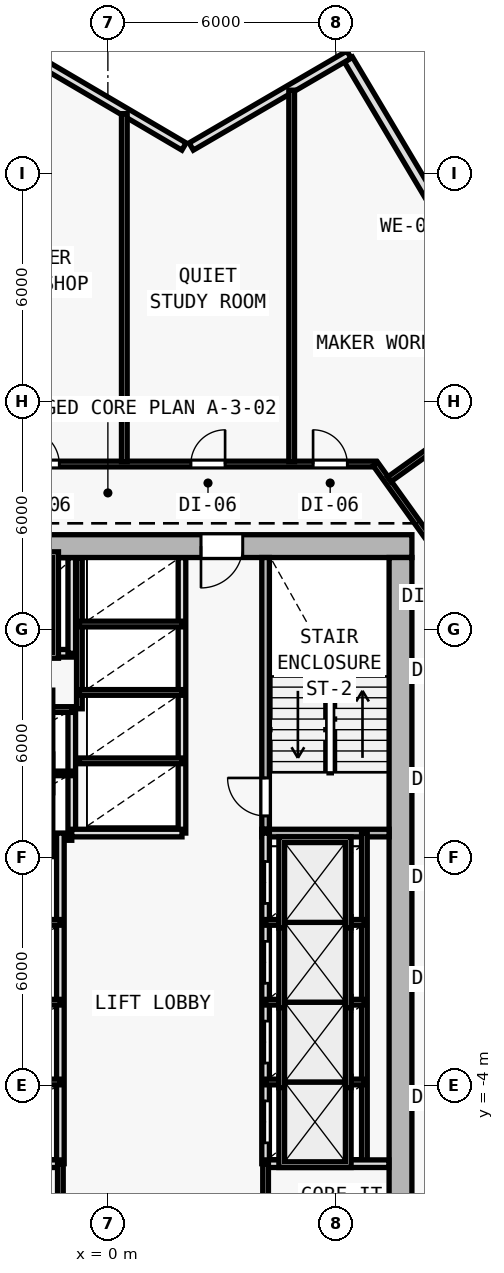
"""IFC4 building model, lengths in metres.
Left out: names, types, materials, properties, quantities, classifications, styles, units other than length and angle.
Written with IfcOpenShell. Run it as: python <this file> out.ifc"""

import sys

from ifc_helpers import new_model, si_unit, direction, frame, frame_2d, origin, origin_2d, place, context, subcontext, project, spatial, rectangle, i_section, extrude, element, fill, save


model = new_model("IFC4")
c1 = context("Model", 3, precision=1e-05, world=origin(), true_north=direction((0.0, 1.0)))
c2 = subcontext(c1, "Body", "Model", "MODEL_VIEW")
j1 = project(units=[si_unit("LENGTHUNIT", "METRE"), si_unit("PLANEANGLEUNIT", "RADIAN")], contexts=[c1])
p1 = place(None, origin())
s1 = spatial("IfcSite", under=j1, at=p1, CompositionType="ELEMENT")
p2 = place(p1, origin())
s2 = spatial("IfcBuilding", under=s1, at=p2, CompositionType="ELEMENT")
p3 = place(p2, frame((0.0, 0.0, 58.8)))
s3 = spatial("IfcBuildingStorey", under=s2, at=p3, CompositionType="ELEMENT", Elevation=58.8)
for number, where, z_axis, x_axis in (
    (1, (7.7, 10.2, 0.0), (0.0, 0.0, 1.0), (1.0, 0.0, 0.0)),
    (2, (7.7, 0.4, 0.0), (0.0, 0.0, 1.0), (1.0, 0.0, 0.0)),
):
    element("IfcColumn", number, at=place(p3, frame(where, z_axis=z_axis, x_axis=x_axis)), inside=s3, PredefinedType="COLUMN", context=c2, shape_type="SweptSolid", body=[
        extrude(i_section(OverallWidth=0.416, OverallDepth=0.446, WebThickness=0.025, FlangeThickness=0.04, FilletRadius=0.015, at=origin_2d()), origin(), (0.0, 0.0, 1.0), 3.6),
    ])
p4 = place(p3, frame((6.328, 23.006, 0.0), z_axis=(0.0, 0.0, 1.0), x_axis=(0.511075811474, -0.859535639125, 0.0)))
e3 = element("IfcWall", 3, at=p4, inside=s3, PredefinedType="SOLIDWALL", context=c2, shape_type="SweptSolid", body=[
    extrude(rectangle(XDim=11.646, YDim=0.25, at=frame_2d((5.823, 0.0))), origin(), (0.0, 0.0, 1.0), 3.35),
])
p5 = place(p4, frame((5.073, 0.0, 0.62)))
e4 = element("IfcOpeningElement", 4, at=p5, cuts=e3, PredefinedType="OPENING", context=c2, shape_type="SweptSolid", body=[
    extrude(rectangle(XDim=1.5, YDim=2.0, at=frame_2d((0.75, 1.0))), frame((0.0, 0.135, 0.0), z_axis=(0.0, -1.0, 0.0), x_axis=(1.0, 0.0, 0.0)), (0.0, 0.0, 1.0), 0.27),
])
p6 = place(p3, frame((2.193, 20.713, 0.0), z_axis=(0.0, 0.0, 1.0), x_axis=(0.863964978951, 0.503551899159, 0.0)))
e5 = element("IfcWall", 5, at=p6, inside=s3, PredefinedType="SOLIDWALL", context=c2, shape_type="SweptSolid", body=[
    extrude(rectangle(XDim=4.805, YDim=0.22, at=frame_2d((2.402, 0.0))), origin(), (0.0, 0.0, 1.0), 3.35),
])
p7 = place(p3, frame((-2.572, 23.403, 0.0), z_axis=(0.0, 0.0, 1.0), x_axis=(0.862137551275, -0.506674296449, 0.0)))
e6 = element("IfcWall", 6, at=p7, inside=s3, PredefinedType="SOLIDWALL", context=c2, shape_type="SweptSolid", body=[
    extrude(rectangle(XDim=5.307, YDim=0.22, at=frame_2d((2.654, 0.0))), origin(), (0.0, 0.0, 1.0), 3.35),
])
p8 = place(p3, frame((8.0, 10.2, 0.0), z_axis=(0.0, 0.0, 1.0), x_axis=(-1.0, 0.0, 0.0)))
e7 = element("IfcWall", 7, at=p8, inside=s3, PredefinedType="SHEAR", context=c2, shape_type="SweptSolid", body=[
    extrude(rectangle(XDim=16.0, YDim=0.6, at=frame_2d((8.0, 0.0))), origin(), (0.0, 0.0, 1.0), 3.35),
])
p9 = place(p8, frame((4.45, 0.0, 0.0)))
e8 = element("IfcOpeningElement", 8, at=p9, cuts=e7, PredefinedType="OPENING", context=c2, shape_type="SweptSolid", body=[
    extrude(rectangle(XDim=1.1, YDim=2.15, at=frame_2d((0.55, 1.075))), frame((0.0, 0.31, 0.0), z_axis=(0.0, -1.0, 0.0), x_axis=(1.0, 0.0, 0.0)), (0.0, 0.0, 1.0), 0.62),
])
p10 = place(p3, frame((7.7, 9.9, 0.0), z_axis=(0.0, 0.0, 1.0), x_axis=(0.0, -1.0, 0.0)))
e9 = element("IfcWall", 9, at=p10, inside=s3, PredefinedType="SHEAR", context=c2, shape_type="SweptSolid", body=[
    extrude(rectangle(XDim=19.0, YDim=0.6, at=frame_2d((9.5, 0.0))), origin(), (0.0, 0.0, 1.0), 3.35),
])
p11 = place(p3, frame((4.15, 2.75, 0.0), z_axis=(0.0, 0.0, 1.0), x_axis=(0.0, 1.0, 0.0)))
e10 = element("IfcWall", 10, at=p11, inside=s3, PredefinedType="SOLIDWALL", context=c2, shape_type="SweptSolid", body=[
    extrude(rectangle(XDim=7.15, YDim=0.2, at=frame_2d((3.575, 0.0))), origin(), (0.0, 0.0, 1.0), 3.35),
])
p12 = place(p11, frame((0.35, 0.0, 0.0)))
e11 = element("IfcOpeningElement", 11, at=p12, cuts=e10, PredefinedType="OPENING", context=c2, shape_type="SweptSolid", body=[
    extrude(rectangle(XDim=1.0, YDim=2.15, at=frame_2d((0.5, 1.075))), frame((0.0, 0.11, 0.0), z_axis=(0.0, -1.0, 0.0), x_axis=(1.0, 0.0, 0.0)), (0.0, 0.0, 1.0), 0.22),
])
p13 = place(p3, frame((4.05, 2.65, 0.0), z_axis=(0.0, 0.0, 1.0), x_axis=(1.0, 0.0, 0.0)))
e12 = element("IfcWall", 12, at=p13, inside=s3, PredefinedType="SOLIDWALL", context=c2, shape_type="SweptSolid", body=[
    extrude(rectangle(XDim=3.35, YDim=0.2, at=frame_2d((1.675, 0.0))), origin(), (0.0, 0.0, 1.0), 3.35),
])
p14 = place(p3, frame((-0.95, 2.65, 0.0), z_axis=(0.0, 0.0, 1.0), x_axis=(0.0, 1.0, 0.0)))
e13 = element("IfcWall", 13, at=p14, inside=s3, PredefinedType="SOLIDWALL", context=c2, shape_type="SweptSolid", body=[
    extrude(rectangle(XDim=3.27, YDim=0.2, at=frame_2d((1.635, 0.0))), origin(), (0.0, 0.0, 1.0), 3.35),
])
for number, where, z_axis, x_axis in (
    (14, (-3.85, 2.52, 0.0), (0.0, 0.0, 1.0), (1.0, 0.0, 0.0)),
    (15, (-3.85, 4.22, 0.0), (0.0, 0.0, 1.0), (1.0, 0.0, 0.0)),
):
    element("IfcWall", number, at=place(p3, frame(where, z_axis=z_axis, x_axis=x_axis)), inside=s3, PredefinedType="PARTITIONING", context=c2, shape_type="SweptSolid", body=[
        extrude(rectangle(XDim=2.9, YDim=0.12, at=frame_2d((1.45, 0.0))), origin(), (0.0, 0.0, 1.0), 3.35),
    ])
p15 = place(p3, frame((-3.85, 5.9, 0.0), z_axis=(0.0, 0.0, 1.0), x_axis=(1.0, 0.0, 0.0)))
e16 = element("IfcWall", 16, at=p15, inside=s3, PredefinedType="PARTITIONING", context=c2, shape_type="SweptSolid", body=[
    extrude(rectangle(XDim=2.9, YDim=0.15, at=frame_2d((1.45, 0.0))), origin(), (0.0, 0.0, 1.0), 3.35),
])
p16 = place(p3, frame((-3.85, 7.38, 0.0), z_axis=(0.0, 0.0, 1.0), x_axis=(1.0, 0.0, 0.0)))
e17 = element("IfcWall", 17, at=p16, inside=s3, PredefinedType="SOLIDWALL", context=c2, shape_type="SweptSolid", body=[
    extrude(rectangle(XDim=2.9, YDim=0.2, at=frame_2d((1.45, 0.0))), origin(), (0.0, 0.0, 1.0), 3.35),
])
p17 = place(p16, frame((0.85, 0.0, 0.0)))
e18 = element("IfcOpeningElement", 18, at=p17, cuts=e17, PredefinedType="OPENING", context=c2, shape_type="SweptSolid", body=[
    extrude(rectangle(XDim=1.2, YDim=2.2, at=frame_2d((0.6, 1.1))), frame((0.0, 0.11, 0.0), z_axis=(0.0, -1.0, 0.0), x_axis=(1.0, 0.0, 0.0)), (0.0, 0.0, 1.0), 0.22),
])
p18 = place(p3, frame((-0.95, 7.38, 0.0), z_axis=(0.0, 0.0, 1.0), x_axis=(0.0, 1.0, 0.0)))
e19 = element("IfcWall", 19, at=p18, inside=s3, PredefinedType="SOLIDWALL", context=c2, shape_type="SweptSolid", body=[
    extrude(rectangle(XDim=2.515, YDim=0.2, at=frame_2d((1.258, 0.0))), origin(), (0.0, 0.0, 1.0), 3.35),
])
p19 = place(p3, frame((4.15, -6.05, 0.0), z_axis=(0.0, 0.0, 1.0), x_axis=(0.0, 1.0, 0.0)))
e20 = element("IfcWall", 20, at=p19, inside=s3, PredefinedType="SOLIDWALL", context=c2, shape_type="SweptSolid", body=[
    extrude(rectangle(XDim=8.7, YDim=0.2, at=frame_2d((4.35, 0.0))), origin(), (0.0, 0.0, 1.0), 3.35),
])
p20 = place(p19, frame((0.55, 0.0, 0.0)))
e21 = element("IfcOpeningElement", 21, at=p20, cuts=e20, PredefinedType="OPENING", context=c2, shape_type="SweptSolid", body=[
    extrude(rectangle(XDim=1.1, YDim=2.15, at=frame_2d((0.55, 1.075))), frame((0.0, 0.11, 0.0), z_axis=(0.0, -1.0, 0.0), x_axis=(1.0, 0.0, 0.0)), (0.0, 0.0, 1.0), 0.22),
])
p21 = place(p19, frame((2.65, 0.0, 0.0)))
e22 = element("IfcOpeningElement", 22, at=p21, cuts=e20, PredefinedType="OPENING", context=c2, shape_type="SweptSolid", body=[
    extrude(rectangle(XDim=1.1, YDim=2.15, at=frame_2d((0.55, 1.075))), frame((0.0, 0.11, 0.0), z_axis=(0.0, -1.0, 0.0), x_axis=(1.0, 0.0, 0.0)), (0.0, 0.0, 1.0), 0.22),
])
p22 = place(p19, frame((4.75, 0.0, 0.0)))
e23 = element("IfcOpeningElement", 23, at=p22, cuts=e20, PredefinedType="OPENING", context=c2, shape_type="SweptSolid", body=[
    extrude(rectangle(XDim=1.1, YDim=2.15, at=frame_2d((0.55, 1.075))), frame((0.0, 0.11, 0.0), z_axis=(0.0, -1.0, 0.0), x_axis=(1.0, 0.0, 0.0)), (0.0, 0.0, 1.0), 0.22),
])
p23 = place(p19, frame((6.85, 0.0, 0.0)))
e24 = element("IfcOpeningElement", 24, at=p23, cuts=e20, PredefinedType="OPENING", context=c2, shape_type="SweptSolid", body=[
    extrude(rectangle(XDim=1.1, YDim=2.15, at=frame_2d((0.55, 1.075))), frame((0.0, 0.11, 0.0), z_axis=(0.0, -1.0, 0.0), x_axis=(1.0, 0.0, 0.0)), (0.0, 0.0, 1.0), 0.22),
])
p24 = place(p3, frame((6.75, -6.05, 0.0), z_axis=(0.0, 0.0, 1.0), x_axis=(0.0, 1.0, 0.0)))
e25 = element("IfcWall", 25, at=p24, inside=s3, PredefinedType="PARTITIONING", context=c2, shape_type="SweptSolid", body=[
    extrude(rectangle(XDim=8.7, YDim=0.15, at=frame_2d((4.35, 0.0))), origin(), (0.0, 0.0, 1.0), 3.35),
])
for number, where, z_axis, x_axis in (
    (26, (4.15, -3.9, 0.0), (0.0, 0.0, 1.0), (1.0, 0.0, 0.0)),
    (27, (4.15, -1.8, 0.0), (0.0, 0.0, 1.0), (1.0, 0.0, 0.0)),
    (28, (4.15, 0.3, 0.0), (0.0, 0.0, 1.0), (1.0, 0.0, 0.0)),
):
    element("IfcWall", number, at=place(p3, frame(where, z_axis=z_axis, x_axis=x_axis)), inside=s3, PredefinedType="PARTITIONING", context=c2, shape_type="SweptSolid", body=[
        extrude(rectangle(XDim=2.6, YDim=0.15, at=frame_2d((1.3, 0.0))), origin(), (0.0, 0.0, 1.0), 3.35),
    ])
p25 = place(p3, frame((-1.25, -6.05, 0.0), z_axis=(0.0, 0.0, 1.0), x_axis=(0.0, 1.0, 0.0)))
e29 = element("IfcWall", 29, at=p25, inside=s3, PredefinedType="SOLIDWALL", context=c2, shape_type="SweptSolid", body=[
    extrude(rectangle(XDim=8.7, YDim=0.2, at=frame_2d((4.35, 0.0))), origin(), (0.0, 0.0, 1.0), 3.35),
])
for number, where, z_axis, x_axis in (
    (30, (-4.15, -3.9, 0.0), (0.0, 0.0, 1.0), (1.0, 0.0, 0.0)),
    (31, (-4.15, -1.8, 0.0), (0.0, 0.0, 1.0), (1.0, 0.0, 0.0)),
    (32, (-4.15, 0.3, 0.0), (0.0, 0.0, 1.0), (1.0, 0.0, 0.0)),
):
    element("IfcWall", number, at=place(p3, frame(where, z_axis=z_axis, x_axis=x_axis)), inside=s3, PredefinedType="PARTITIONING", context=c2, shape_type="SweptSolid", body=[
        extrude(rectangle(XDim=2.9, YDim=0.15, at=frame_2d((1.45, 0.0))), origin(), (0.0, 0.0, 1.0), 3.35),
    ])
p26 = place(p3, frame((1.95, 2.65, 0.0), z_axis=(0.0, 0.0, 1.0), x_axis=(0.0, 1.0, 0.0)))
e33 = element("IfcWall", 33, at=p26, inside=s3, PredefinedType="SOLIDWALL", context=c2, shape_type="SweptSolid", body=[
    extrude(rectangle(XDim=7.245, YDim=0.2, at=frame_2d((3.623, 0.0))), origin(), (0.0, 0.0, 1.0), 3.35),
])
p27 = place(p3, frame((-0.95, 2.65, 0.0), z_axis=(0.0, 0.0, 1.0), x_axis=(1.0, 0.0, 0.0)))
e34 = element("IfcWall", 34, at=p27, inside=s3, PredefinedType="SOLIDWALL", context=c2, shape_type="SweptSolid", body=[
    extrude(rectangle(XDim=2.9, YDim=0.2, at=frame_2d((1.45, 0.0))), origin(), (0.0, 0.0, 1.0), 3.35),
])
p28 = place(p3, frame((-0.75, 5.92, 0.0), z_axis=(0.0, 0.0, 1.0), x_axis=(0.0, 1.0, 0.0)))
e35 = element("IfcWall", 35, at=p28, inside=s3, PredefinedType="PARTITIONING", context=c2, shape_type="SweptSolid", body=[
    extrude(rectangle(XDim=3.975, YDim=0.15, at=frame_2d((1.988, 0.0))), origin(), (0.0, 0.0, 1.0), 3.35),
])
for number, where, z_axis, x_axis in (
    (36, (-0.75, 4.55, 0.0), (0.0, 0.0, 1.0), (1.0, 0.0, 0.0)),
    (37, (-0.75, 6.35, 0.0), (0.0, 0.0, 1.0), (1.0, 0.0, 0.0)),
    (38, (-0.75, 8.15, 0.0), (0.0, 0.0, 1.0), (1.0, 0.0, 0.0)),
):
    element("IfcWall", number, at=place(p3, frame(where, z_axis=z_axis, x_axis=x_axis)), inside=s3, PredefinedType="PARTITIONING", context=c2, shape_type="SweptSolid", body=[
        extrude(rectangle(XDim=2.7, YDim=0.15, at=frame_2d((1.35, 0.0))), origin(), (0.0, 0.0, 1.0), 3.35),
    ])
p29 = place(p3, frame((-4.04, -6.05, 0.0), z_axis=(0.0, 0.0, 1.0), x_axis=(1.0, 0.0, 0.0)))
e39 = element("IfcWall", 39, at=p29, inside=s3, PredefinedType="SOLIDWALL", context=c2, shape_type="SweptSolid", body=[
    extrude(rectangle(XDim=2.79, YDim=0.2, at=frame_2d((1.395, 0.0))), origin(), (0.0, 0.0, 1.0), 3.35),
])
p30 = place(p3, frame((4.15, -6.05, 0.0), z_axis=(0.0, 0.0, 1.0), x_axis=(1.0, 0.0, 0.0)))
e40 = element("IfcWall", 40, at=p30, inside=s3, PredefinedType="SOLIDWALL", context=c2, shape_type="SweptSolid", body=[
    extrude(rectangle(XDim=3.245, YDim=0.2, at=frame_2d((1.623, 0.0))), origin(), (0.0, 0.0, 1.0), 3.35),
])
p31 = place(p3, frame((-1.25, -9.095, 0.0), z_axis=(0.0, 0.0, 1.0), x_axis=(0.0, 1.0, 0.0)))
e41 = element("IfcWall", 41, at=p31, inside=s3, PredefinedType="PARTITIONING", context=c2, shape_type="SweptSolid", body=[
    extrude(rectangle(XDim=3.045, YDim=0.15, at=frame_2d((1.522, 0.0))), origin(), (0.0, 0.0, 1.0), 3.35),
])
p32 = place(p31, frame((0.845, 0.0, 0.0)))
e42 = element("IfcOpeningElement", 42, at=p32, cuts=e41, PredefinedType="OPENING", context=c2, shape_type="SweptSolid", body=[
    extrude(rectangle(XDim=0.95, YDim=2.1, at=frame_2d((0.475, 1.05))), frame((0.0, 0.085, 0.0), z_axis=(0.0, -1.0, 0.0), x_axis=(1.0, 0.0, 0.0)), (0.0, 0.0, 1.0), 0.17),
])
p33 = place(p3, frame((4.15, -9.095, 0.0), z_axis=(0.0, 0.0, 1.0), x_axis=(0.0, 1.0, 0.0)))
e43 = element("IfcWall", 43, at=p33, inside=s3, PredefinedType="PARTITIONING", context=c2, shape_type="SweptSolid", body=[
    extrude(rectangle(XDim=3.045, YDim=0.15, at=frame_2d((1.522, 0.0))), origin(), (0.0, 0.0, 1.0), 3.35),
])
p34 = place(p33, frame((0.845, 0.0, 0.0)))
e44 = element("IfcOpeningElement", 44, at=p34, cuts=e43, PredefinedType="OPENING", context=c2, shape_type="SweptSolid", body=[
    extrude(rectangle(XDim=0.9, YDim=2.1, at=frame_2d((0.45, 1.05))), frame((0.0, 0.085, 0.0), z_axis=(0.0, -1.0, 0.0), x_axis=(1.0, 0.0, 0.0)), (0.0, 0.0, 1.0), 0.17),
])
p35 = place(p3, frame((-7.041, 12.36, 0.0), z_axis=(0.0, 0.0, 1.0), x_axis=(1.0, 0.0, 0.0)))
e45 = element("IfcWall", 45, at=p35, inside=s3, PredefinedType="PARTITIONING", context=c2, shape_type="SweptSolid", body=[
    extrude(rectangle(XDim=14.082, YDim=0.15, at=frame_2d((7.041, 0.0))), origin(), (0.0, 0.0, 1.0), 3.35),
])
p36 = place(p35, frame((12.441, 0.0, 0.0)))
e46 = element("IfcOpeningElement", 46, at=p36, cuts=e45, PredefinedType="OPENING", context=c2, shape_type="SweptSolid", body=[
    extrude(rectangle(XDim=0.9, YDim=2.1, at=frame_2d((0.45, 1.05))), frame((0.0, 0.085, 0.0), z_axis=(0.0, -1.0, 0.0), x_axis=(1.0, 0.0, 0.0)), (0.0, 0.0, 1.0), 0.17),
])
p37 = place(p35, frame((9.226, 0.0, 0.0)))
e47 = element("IfcOpeningElement", 47, at=p37, cuts=e45, PredefinedType="OPENING", context=c2, shape_type="SweptSolid", body=[
    extrude(rectangle(XDim=0.9, YDim=2.1, at=frame_2d((0.45, 1.05))), frame((0.0, 0.085, 0.0), z_axis=(0.0, -1.0, 0.0), x_axis=(1.0, 0.0, 0.0)), (0.0, 0.0, 1.0), 0.17),
])
p38 = place(p35, frame((4.862, 0.0, 0.0)))
e48 = element("IfcOpeningElement", 48, at=p38, cuts=e45, PredefinedType="OPENING", context=c2, shape_type="SweptSolid", body=[
    extrude(rectangle(XDim=0.9, YDim=2.1, at=frame_2d((0.45, 1.05))), frame((0.0, 0.085, 0.0), z_axis=(0.0, -1.0, 0.0), x_axis=(1.0, 0.0, 0.0)), (0.0, 0.0, 1.0), 0.17),
])
p39 = place(p35, frame((1.214, 0.0, 0.0)))
e49 = element("IfcOpeningElement", 49, at=p39, cuts=e45, PredefinedType="OPENING", context=c2, shape_type="SweptSolid", body=[
    extrude(rectangle(XDim=0.9, YDim=2.1, at=frame_2d((0.45, 1.05))), frame((0.0, 0.085, 0.0), z_axis=(0.0, -1.0, 0.0), x_axis=(1.0, 0.0, 0.0)), (0.0, 0.0, 1.0), 0.17),
])
p40 = place(p3, frame((7.041, 12.36, 0.0), z_axis=(0.0, 0.0, 1.0), x_axis=(0.582449511476, -0.812866881218, 0.0)))
e50 = element("IfcWall", 50, at=p40, inside=s3, PredefinedType="PARTITIONING", context=c2, shape_type="SweptSolid", body=[
    extrude(rectangle(XDim=4.84, YDim=0.15, at=frame_2d((2.42, 0.0))), origin(), (0.0, 0.0, 1.0), 2.725),
])
p41 = place(p40, frame((2.775, 0.0, 0.0)))
e51 = element("IfcOpeningElement", 51, at=p41, cuts=e50, PredefinedType="OPENING", context=c2, shape_type="SweptSolid", body=[
    extrude(rectangle(XDim=0.85, YDim=2.1, at=frame_2d((0.425, 1.05))), frame((0.0, 0.085, 0.0), z_axis=(0.0, -1.0, 0.0), x_axis=(1.0, 0.0, 0.0)), (0.0, 0.0, 1.0), 0.17),
])
p42 = place(p3, frame((7.404, 11.957, 0.0), z_axis=(0.0, 0.0, 1.0), x_axis=(0.812874232522, 0.582439251856, 0.0)))
e52 = element("IfcWall", 52, at=p42, inside=s3, PredefinedType="PARTITIONING", context=c2, shape_type="SweptSolid", body=[
    extrude(rectangle(XDim=4.689, YDim=0.15, at=frame_2d((2.345, 0.0))), origin(), (0.0, 0.0, 1.0), 2.725),
])
p43 = place(p3, frame((0.433, 12.42, 0.0), z_axis=(0.0, 0.0, 1.0), x_axis=(0.0, 1.0, 0.0)))
e53 = element("IfcWall", 53, at=p43, inside=s3, PredefinedType="PARTITIONING", context=c2, shape_type="SweptSolid", body=[
    extrude(rectangle(XDim=9.159, YDim=0.15, at=frame_2d((4.58, 0.0))), origin(), (0.0, 0.0, 1.0), 2.735),
])
p44 = place(p3, frame((4.836, 12.42, 0.0), z_axis=(0.0, 0.0, 1.0), x_axis=(0.0, 1.0, 0.0)))
e54 = element("IfcWall", 54, at=p44, inside=s3, PredefinedType="PARTITIONING", context=c2, shape_type="SweptSolid", body=[
    extrude(rectangle(XDim=9.776, YDim=0.15, at=frame_2d((4.888, 0.0))), origin(), (0.0, 0.0, 1.0), 2.735),
])
p45 = place(p9, origin())
e55 = element("IfcDoor", 55, at=p45, inside=s3, OperationType="SINGLE_SWING_RIGHT", PredefinedType="DOOR", context=c2, shape_type="SweptSolid", body=[
    extrude(rectangle(XDim=1.1, YDim=2.15, at=frame_2d((0.55, 1.075))), frame((0.0, 0.025, 0.0), z_axis=(0.0, -1.0, 0.0), x_axis=(1.0, 0.0, 0.0)), (0.0, 0.0, 1.0), 0.05),
])
fill(e8, e55)
p46 = place(p12, origin())
e56 = element("IfcDoor", 56, at=p46, inside=s3, OperationType="SINGLE_SWING_RIGHT", PredefinedType="DOOR", context=c2, shape_type="SweptSolid", body=[
    extrude(rectangle(XDim=1.0, YDim=2.15, at=frame_2d((0.5, 1.075))), frame((0.0, 0.025, 0.0), z_axis=(0.0, -1.0, 0.0), x_axis=(1.0, 0.0, 0.0)), (0.0, 0.0, 1.0), 0.05),
])
fill(e11, e56)
p47 = place(p20, origin())
e57 = element("IfcDoor", 57, at=p47, inside=s3, OperationType="DOUBLE_DOOR_SLIDING", PredefinedType="DOOR", context=c2, shape_type="SweptSolid", body=[
    extrude(rectangle(XDim=1.1, YDim=2.15, at=frame_2d((0.55, 1.075))), frame((0.0, 0.025, 0.0), z_axis=(0.0, -1.0, 0.0), x_axis=(1.0, 0.0, 0.0)), (0.0, 0.0, 1.0), 0.05),
])
fill(e21, e57)
p48 = place(p21, origin())
e58 = element("IfcDoor", 58, at=p48, inside=s3, OperationType="DOUBLE_DOOR_SLIDING", PredefinedType="DOOR", context=c2, shape_type="SweptSolid", body=[
    extrude(rectangle(XDim=1.1, YDim=2.15, at=frame_2d((0.55, 1.075))), frame((0.0, 0.025, 0.0), z_axis=(0.0, -1.0, 0.0), x_axis=(1.0, 0.0, 0.0)), (0.0, 0.0, 1.0), 0.05),
])
fill(e22, e58)
p49 = place(p22, origin())
e59 = element("IfcDoor", 59, at=p49, inside=s3, OperationType="DOUBLE_DOOR_SLIDING", PredefinedType="DOOR", context=c2, shape_type="SweptSolid", body=[
    extrude(rectangle(XDim=1.1, YDim=2.15, at=frame_2d((0.55, 1.075))), frame((0.0, 0.025, 0.0), z_axis=(0.0, -1.0, 0.0), x_axis=(1.0, 0.0, 0.0)), (0.0, 0.0, 1.0), 0.05),
])
fill(e23, e59)
p50 = place(p23, origin())
e60 = element("IfcDoor", 60, at=p50, inside=s3, OperationType="DOUBLE_DOOR_SLIDING", PredefinedType="DOOR", context=c2, shape_type="SweptSolid", body=[
    extrude(rectangle(XDim=1.1, YDim=2.15, at=frame_2d((0.55, 1.075))), frame((0.0, 0.025, 0.0), z_axis=(0.0, -1.0, 0.0), x_axis=(1.0, 0.0, 0.0)), (0.0, 0.0, 1.0), 0.05),
])
fill(e24, e60)
p51 = place(p36, origin())
e61 = element("IfcDoor", 61, at=p51, inside=s3, OperationType="SINGLE_SWING_LEFT", PredefinedType="DOOR", context=c2, shape_type="SweptSolid", body=[
    extrude(rectangle(XDim=0.9, YDim=2.1, at=frame_2d((0.45, 1.05))), frame((0.0, 0.025, 0.0), z_axis=(0.0, -1.0, 0.0), x_axis=(1.0, 0.0, 0.0)), (0.0, 0.0, 1.0), 0.05),
])
fill(e46, e61)
p52 = place(p37, origin())
e62 = element("IfcDoor", 62, at=p52, inside=s3, OperationType="SINGLE_SWING_RIGHT", PredefinedType="DOOR", context=c2, shape_type="SweptSolid", body=[
    extrude(rectangle(XDim=0.9, YDim=2.1, at=frame_2d((0.45, 1.05))), frame((0.0, 0.025, 0.0), z_axis=(0.0, -1.0, 0.0), x_axis=(1.0, 0.0, 0.0)), (0.0, 0.0, 1.0), 0.05),
])
fill(e47, e62)
p53 = place(p38, origin())
e63 = element("IfcDoor", 63, at=p53, inside=s3, OperationType="SINGLE_SWING_LEFT", PredefinedType="DOOR", context=c2, shape_type="SweptSolid", body=[
    extrude(rectangle(XDim=0.9, YDim=2.1, at=frame_2d((0.45, 1.05))), frame((0.0, 0.025, 0.0), z_axis=(0.0, -1.0, 0.0), x_axis=(1.0, 0.0, 0.0)), (0.0, 0.0, 1.0), 0.05),
])
fill(e48, e63)
save(model, sys.argv[1])
